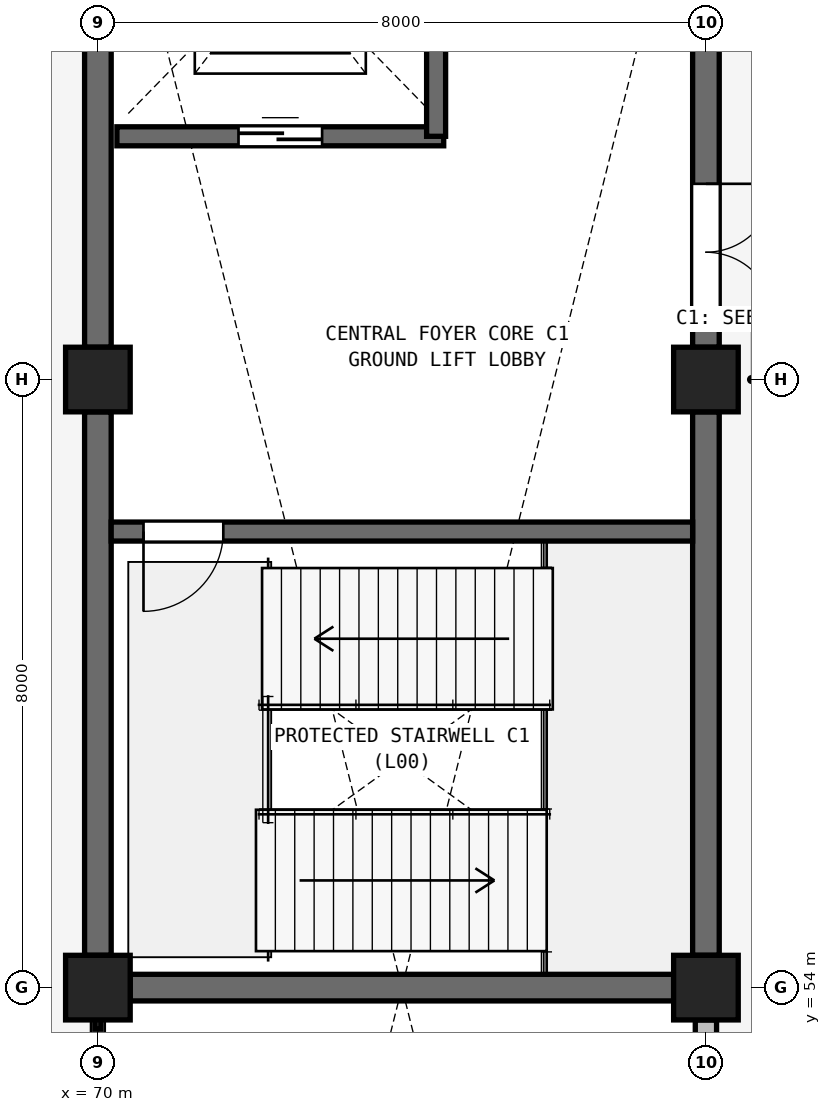
"""IFC4 building model, lengths in metres.
Left out: names, types, materials, properties, quantities, classifications, styles, units other than length and angle.
Written with IfcOpenShell. Run it as: python <this file> out.ifc"""

import sys

from ifc_helpers import new_model, si_unit, direction, frame, frame_2d, origin, origin_2d, place, context, subcontext, project, spatial, rectangle, circle, extrude, element, fill, save


model = new_model("IFC4")
c1 = context("Model", 3, precision=1e-05, world=origin(), true_north=direction((0.0, 1.0)))
c2 = subcontext(c1, "Body", "Model", "MODEL_VIEW")
j1 = project(units=[si_unit("LENGTHUNIT", "METRE"), si_unit("PLANEANGLEUNIT", "RADIAN")], contexts=[c1])
p1 = place(None, origin())
s1 = spatial("IfcSite", under=j1, at=p1, CompositionType="ELEMENT")
p2 = place(p1, origin())
s2 = spatial("IfcBuilding", under=s1, at=p2, CompositionType="ELEMENT")
p3 = place(p2, origin())
s3 = spatial("IfcBuildingStorey", under=s2, at=p3, CompositionType="ELEMENT", Elevation=0.0)
for number, where, z_axis, x_axis in (
    (1, (70.0, 54.0, 0.0), (0.0, 0.0, 1.0), (1.0, 0.0, 0.0)),
    (2, (70.0, 62.0, 0.0), (0.0, 0.0, 1.0), (1.0, 0.0, 0.0)),
    (3, (78.0, 54.0, 0.0), (0.0, 0.0, 1.0), (1.0, 0.0, 0.0)),
    (4, (78.0, 62.0, 0.0), (0.0, 0.0, 1.0), (1.0, 0.0, 0.0)),
):
    element("IfcColumn", number, at=place(p3, frame(where, z_axis=z_axis, x_axis=x_axis)), inside=s3, PredefinedType="COLUMN", context=c2, shape_type="SweptSolid", body=[
        extrude(circle(Radius=0.425, at=origin_2d()), origin(), (0.0, 0.0, 1.0), 5.4),
    ])
p4 = place(p3, frame((78.0, 46.425, 0.0), z_axis=(0.0, 0.0, 1.0), x_axis=(0.0, 1.0, 0.0)))
e5 = element("IfcWall", 5, at=p4, inside=s3, PredefinedType="SOLIDWALL", context=c2, shape_type="SweptSolid", body=[
    extrude(rectangle(XDim=7.15, YDim=0.28, at=frame_2d((3.575, 0.0))), origin(), (0.0, 0.0, 1.0), 4.14),
])
p5 = place(p4, frame((2.0, 0.0, 0.0)))
e6 = element("IfcOpeningElement", 6, at=p5, cuts=e5, PredefinedType="OPENING", context=c2, shape_type="SweptSolid", body=[
    extrude(rectangle(XDim=2.4, YDim=2.4, at=frame_2d((1.2, 1.2))), frame((0.0, 0.15, 0.0), z_axis=(0.0, -1.0, 0.0), x_axis=(1.0, 0.0, 0.0)), (0.0, 0.0, 1.0), 0.3),
])
for number, where, z_axis, x_axis in (
    (7, (70.425, 54.0, 0.0), (0.0, 0.0, 1.0), (1.0, 0.0, 0.0)),
    (8, (70.0, 54.425, 0.0), (0.0, 0.0, 1.0), (0.0, 1.0, 0.0)),
    (9, (70.0, 62.425, 0.0), (0.0, 0.0, 1.0), (0.0, 1.0, 0.0)),
    (10, (78.0, 54.425, 0.0), (0.0, 0.0, 1.0), (0.0, 1.0, 0.0)),
):
    element("IfcWall", number, at=place(p3, frame(where, z_axis=z_axis, x_axis=x_axis)), inside=s3, PredefinedType="SHEAR", context=c2, shape_type="SweptSolid", body=[
        extrude(rectangle(XDim=7.15, YDim=0.35, at=frame_2d((3.575, 0.0))), origin(), (0.0, 0.0, 1.0), 5.18),
    ])
p6 = place(p3, frame((78.0, 62.425, 0.0), z_axis=(0.0, 0.0, 1.0), x_axis=(0.0, 1.0, 0.0)))
e11 = element("IfcWall", 11, at=p6, inside=s3, PredefinedType="SHEAR", context=c2, shape_type="SweptSolid", body=[
    extrude(rectangle(XDim=7.15, YDim=0.35, at=frame_2d((3.575, 0.0))), origin(), (0.0, 0.0, 1.0), 5.18),
])
p7 = place(p6, frame((0.35, 0.0, 0.0)))
e12 = element("IfcOpeningElement", 12, at=p7, cuts=e11, PredefinedType="OPENING", context=c2, shape_type="SweptSolid", body=[
    extrude(rectangle(XDim=1.8, YDim=2.2, at=frame_2d((0.9, 1.1))), frame((0.0, 0.185, 0.0), z_axis=(0.0, -1.0, 0.0), x_axis=(1.0, 0.0, 0.0)), (0.0, 0.0, 1.0), 0.37),
])
p8 = place(p3, frame((70.175, 60.0, 0.0), z_axis=(0.0, 0.0, 1.0), x_axis=(1.0, 0.0, 0.0)))
e13 = element("IfcWall", 13, at=p8, inside=s3, PredefinedType="SOLIDWALL", context=c2, shape_type="SweptSolid", body=[
    extrude(rectangle(XDim=7.65, YDim=0.25, at=frame_2d((3.825, 0.0))), origin(), (0.0, 0.0, 1.0), 5.18),
])
p9 = place(p8, frame((0.425, 0.0, 0.0)))
e14 = element("IfcOpeningElement", 14, at=p9, cuts=e13, PredefinedType="OPENING", context=c2, shape_type="SweptSolid", body=[
    extrude(rectangle(XDim=1.05, YDim=2.2, at=frame_2d((0.525, 1.1))), frame((0.0, 0.135, 0.0), z_axis=(0.0, -1.0, 0.0), x_axis=(1.0, 0.0, 0.0)), (0.0, 0.0, 1.0), 0.27),
])
p10 = place(p3, frame((70.25, 65.2, 0.0), z_axis=(0.0, 0.0, 1.0), x_axis=(1.0, 0.0, 0.0)))
e15 = element("IfcWall", 15, at=p10, inside=s3, PredefinedType="SOLIDWALL", context=c2, shape_type="SweptSolid", body=[
    extrude(rectangle(XDim=4.3, YDim=0.25, at=frame_2d((2.15, 0.0))), origin(), (0.0, 0.0, 1.0), 5.18),
])
p11 = place(p10, frame((1.6, 0.0, 0.0)))
e16 = element("IfcOpeningElement", 16, at=p11, cuts=e15, PredefinedType="OPENING", context=c2, shape_type="SweptSolid", body=[
    extrude(rectangle(XDim=1.1, YDim=2.2, at=frame_2d((0.55, 1.1))), frame((0.0, 0.135, 0.0), z_axis=(0.0, -1.0, 0.0), x_axis=(1.0, 0.0, 0.0)), (0.0, 0.0, 1.0), 0.27),
])
p12 = place(p3, frame((74.45, 65.2, 0.0), z_axis=(0.0, 0.0, 1.0), x_axis=(0.0, 1.0, 0.0)))
e17 = element("IfcWall", 17, at=p12, inside=s3, PredefinedType="SOLIDWALL", context=c2, shape_type="SweptSolid", body=[
    extrude(rectangle(XDim=4.55, YDim=0.25, at=frame_2d((2.275, 0.0))), origin(), (0.0, 0.0, 1.0), 5.18),
])
p13 = place(p7, frame((1.8, 0.0, 0.0), z_axis=(0.0, 0.0, 1.0), x_axis=(-1.0, 0.0, 0.0)))
e18 = element("IfcDoor", 18, at=p13, inside=s3, OperationType="DOUBLE_DOOR_SINGLE_SWING", PredefinedType="DOOR", context=c2, shape_type="SweptSolid", body=[
    extrude(rectangle(XDim=1.8, YDim=2.2, at=frame_2d((0.9, 1.1))), frame((0.0, 0.025, 0.0), z_axis=(0.0, -1.0, 0.0), x_axis=(1.0, 0.0, 0.0)), (0.0, 0.0, 1.0), 0.05),
])
fill(e12, e18)
p14 = place(p9, frame((1.05, 0.0, 0.0), z_axis=(0.0, 0.0, 1.0), x_axis=(-1.0, 0.0, 0.0)))
e19 = element("IfcDoor", 19, at=p14, inside=s3, OperationType="SINGLE_SWING_LEFT", PredefinedType="DOOR", context=c2, shape_type="SweptSolid", body=[
    extrude(rectangle(XDim=1.05, YDim=2.2, at=frame_2d((0.525, 1.1))), frame((0.0, 0.025, 0.0), z_axis=(0.0, -1.0, 0.0), x_axis=(1.0, 0.0, 0.0)), (0.0, 0.0, 1.0), 0.05),
])
fill(e14, e19)
p15 = place(p11, origin())
e20 = element("IfcDoor", 20, at=p15, inside=s3, OperationType="DOUBLE_DOOR_SLIDING", PredefinedType="DOOR", context=c2, shape_type="SweptSolid", body=[
    extrude(rectangle(XDim=1.1, YDim=2.2, at=frame_2d((0.55, 1.1))), frame((0.0, 0.025, 0.0), z_axis=(0.0, -1.0, 0.0), x_axis=(1.0, 0.0, 0.0)), (0.0, 0.0, 1.0), 0.05),
])
fill(e16, e20)
save(model, sys.argv[1])
